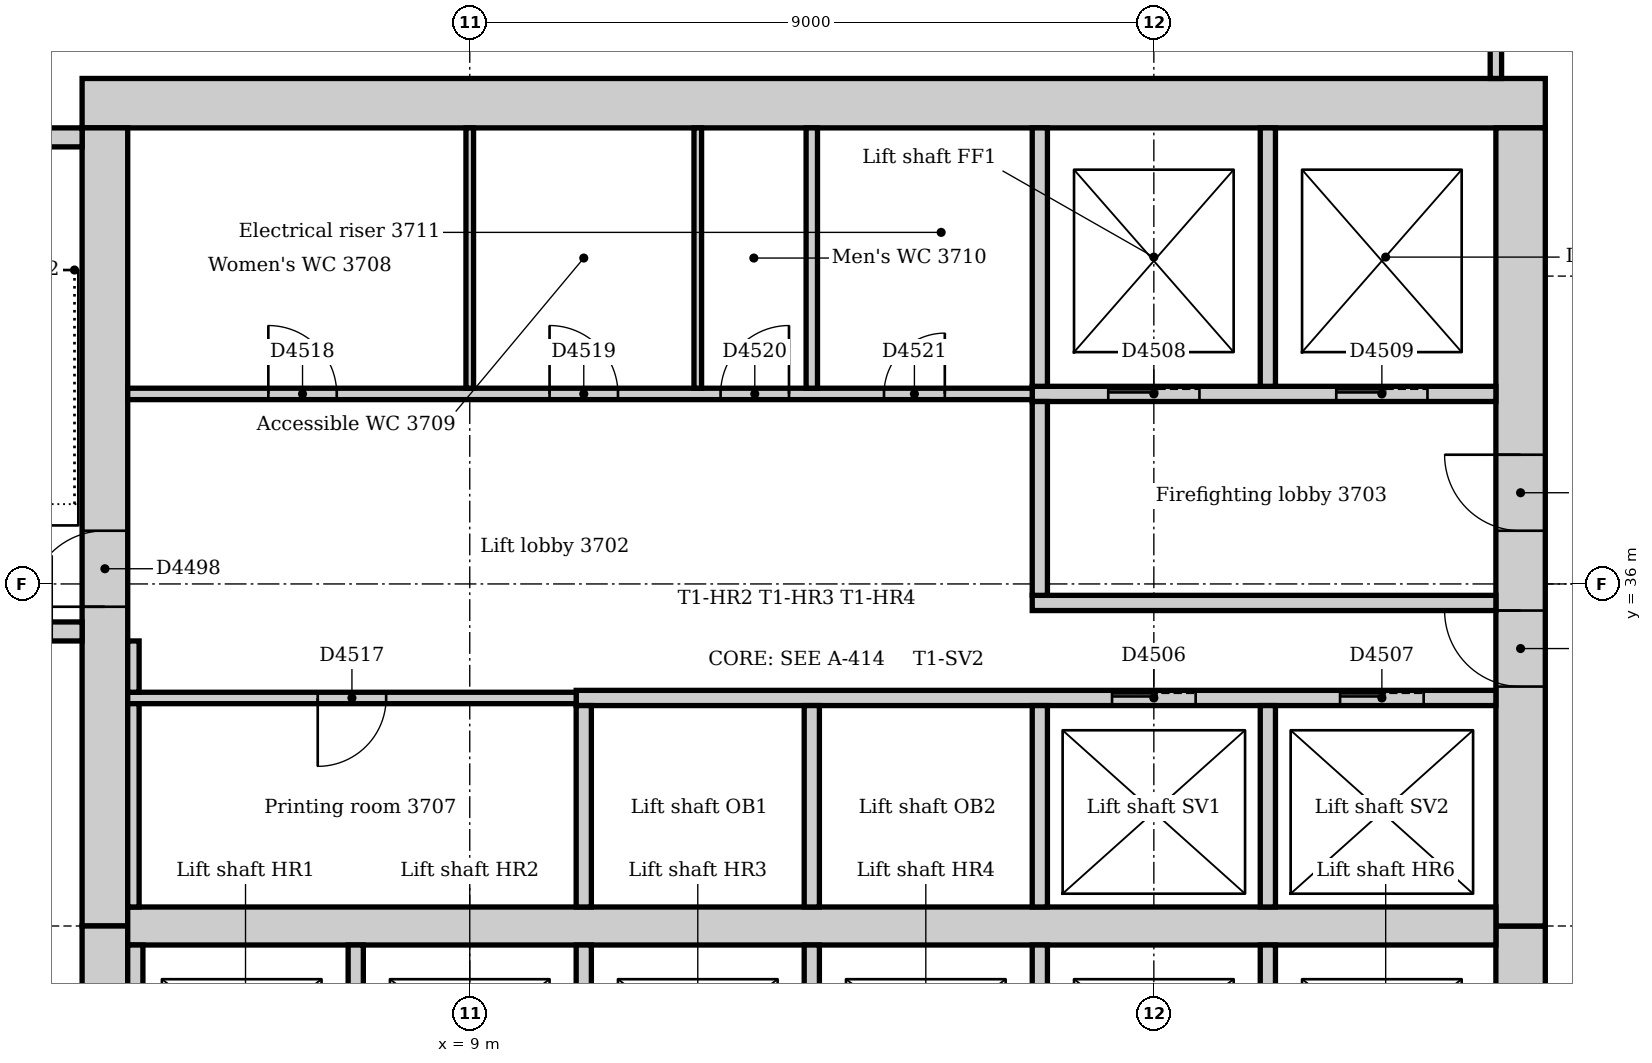
"""IFC4 building model, lengths in metres.
Left out: names, types, materials, properties, quantities, classifications, styles, units other than length and angle.
Written with IfcOpenShell. Run it as: python <this file> out.ifc"""

import sys

from ifc_helpers import new_model, si_unit, direction, frame, frame_2d, origin, place, context, subcontext, project, spatial, rectangle, extrude, element, fill, save


model = new_model("IFC4")
c1 = context("Model", 3, precision=1e-05, world=origin(), true_north=direction((0.0, 1.0)))
c2 = subcontext(c1, "Body", "Model", "MODEL_VIEW")
j1 = project(units=[si_unit("LENGTHUNIT", "METRE"), si_unit("PLANEANGLEUNIT", "RADIAN")], contexts=[c1])
p1 = place(None, origin())
s1 = spatial("IfcSite", under=j1, at=p1, CompositionType="ELEMENT")
p2 = place(p1, origin())
s2 = spatial("IfcBuilding", under=s1, at=p2, CompositionType="ELEMENT")
p3 = place(p2, frame((0.0, 0.0, 157.0)))
s3 = spatial("IfcBuildingStorey", under=s2, at=p3, CompositionType="ELEMENT", Elevation=157.0)
p4 = place(p3, frame((23.15, 42.325, 0.0), z_axis=(0.0, 0.0, 1.0), x_axis=(-1.0, 0.0, 0.0)))
e1 = element("IfcWall", 1, at=p4, inside=s3, PredefinedType="SOLIDWALL", context=c2, shape_type="SweptSolid", body=[
    extrude(rectangle(XDim=19.25, YDim=0.65, at=frame_2d((9.625, 0.0))), origin(), (0.0, 0.0, 1.0), 4.0),
])
p5 = place(p3, frame((22.825, 21.0, 0.0), z_axis=(0.0, 0.0, 1.0), x_axis=(0.0, 1.0, 0.0)))
e2 = element("IfcWall", 2, at=p5, inside=s3, PredefinedType="SOLIDWALL", context=c2, shape_type="SweptSolid", body=[
    extrude(rectangle(XDim=10.5, YDim=0.65, at=frame_2d((5.25, 0.0))), origin(), (0.0, 0.0, 1.0), 4.0),
])
p6 = place(p5, frame((4.35, 0.0, 0.0)))
e3 = element("IfcOpeningElement", 3, at=p6, cuts=e2, PredefinedType="OPENING", context=c2, shape_type="SweptSolid", body=[
    extrude(rectangle(XDim=1.8, YDim=2.1, at=frame_2d((0.9, 1.05))), frame((0.0, 0.335, 0.0), z_axis=(0.0, -1.0, 0.0), x_axis=(1.0, 0.0, 0.0)), (0.0, 0.0, 1.0), 0.67),
])
p7 = place(p3, frame((22.825, 31.5, 0.0), z_axis=(0.0, 0.0, 1.0), x_axis=(0.0, 1.0, 0.0)))
e4 = element("IfcWall", 4, at=p7, inside=s3, PredefinedType="SOLIDWALL", context=c2, shape_type="SweptSolid", body=[
    extrude(rectangle(XDim=10.5, YDim=0.65, at=frame_2d((5.25, 0.0))), origin(), (0.0, 0.0, 1.0), 4.0),
])
p8 = place(p7, frame((3.15, 0.0, 0.0)))
e5 = element("IfcOpeningElement", 5, at=p8, cuts=e4, PredefinedType="OPENING", context=c2, shape_type="SweptSolid", body=[
    extrude(rectangle(XDim=1.0, YDim=2.1, at=frame_2d((0.5, 1.05))), frame((0.0, 0.335, 0.0), z_axis=(0.0, -1.0, 0.0), x_axis=(1.0, 0.0, 0.0)), (0.0, 0.0, 1.0), 0.67),
])
p9 = place(p7, frame((5.2, 0.0, 0.0)))
e6 = element("IfcOpeningElement", 6, at=p9, cuts=e4, PredefinedType="OPENING", context=c2, shape_type="SweptSolid", body=[
    extrude(rectangle(XDim=1.0, YDim=2.1, at=frame_2d((0.5, 1.05))), frame((0.0, 0.335, 0.0), z_axis=(0.0, -1.0, 0.0), x_axis=(1.0, 0.0, 0.0)), (0.0, 0.0, 1.0), 0.67),
])
p10 = place(p3, frame((4.2, 42.0, 0.0), z_axis=(0.0, 0.0, 1.0), x_axis=(0.0, -1.0, 0.0)))
e7 = element("IfcWall", 7, at=p10, inside=s3, PredefinedType="SOLIDWALL", context=c2, shape_type="SweptSolid", body=[
    extrude(rectangle(XDim=10.5, YDim=0.6, at=frame_2d((5.25, 0.0))), origin(), (0.0, 0.0, 1.0), 4.0),
])
p11 = place(p10, frame((5.3, 0.0, 0.0)))
e8 = element("IfcOpeningElement", 8, at=p11, cuts=e7, PredefinedType="OPENING", context=c2, shape_type="SweptSolid", body=[
    extrude(rectangle(XDim=1.0, YDim=2.1, at=frame_2d((0.5, 1.05))), frame((0.0, 0.31, 0.0), z_axis=(0.0, -1.0, 0.0), x_axis=(1.0, 0.0, 0.0)), (0.0, 0.0, 1.0), 0.62),
])
p12 = place(p3, frame((4.2, 31.5, 0.0), z_axis=(0.0, 0.0, 1.0), x_axis=(0.0, -1.0, 0.0)))
e9 = element("IfcWall", 9, at=p12, inside=s3, PredefinedType="SOLIDWALL", context=c2, shape_type="SweptSolid", body=[
    extrude(rectangle(XDim=10.5, YDim=0.6, at=frame_2d((5.25, 0.0))), origin(), (0.0, 0.0, 1.0), 4.0),
])
p13 = place(p12, frame((4.25, 0.0, 0.0)))
e10 = element("IfcOpeningElement", 10, at=p13, cuts=e9, PredefinedType="OPENING", context=c2, shape_type="SweptSolid", body=[
    extrude(rectangle(XDim=1.0, YDim=2.1, at=frame_2d((0.5, 1.05))), frame((0.0, 0.31, 0.0), z_axis=(0.0, -1.0, 0.0), x_axis=(1.0, 0.0, 0.0)), (0.0, 0.0, 1.0), 0.62),
])
p14 = place(p3, frame((4.5, 31.5, 0.0), z_axis=(0.0, 0.0, 1.0), x_axis=(1.0, 0.0, 0.0)))
e11 = element("IfcWall", 11, at=p14, inside=s3, PredefinedType="SOLIDWALL", context=c2, shape_type="SweptSolid", body=[
    extrude(rectangle(XDim=18.0, YDim=0.5, at=frame_2d((9.0, 0.0))), origin(), (0.0, 0.0, 1.0), 4.0),
])
p15 = place(p3, frame((0.36, 35.375, 0.0), z_axis=(0.0, 0.0, 1.0), x_axis=(1.0, 0.0, 0.0)))
e12 = element("IfcWall", 12, at=p15, inside=s3, PredefinedType="SOLIDWALL", context=c2, shape_type="SweptSolid", body=[
    extrude(rectangle(XDim=3.54, YDim=0.25, at=frame_2d((1.77, 0.0))), origin(), (0.0, 0.0, 1.0), 4.0),
])
p16 = place(p15, frame((2.14, 0.0, 0.0)))
e13 = element("IfcOpeningElement", 13, at=p16, cuts=e12, PredefinedType="OPENING", context=c2, shape_type="SweptSolid", body=[
    extrude(rectangle(XDim=1.0, YDim=2.1, at=frame_2d((0.5, 1.05))), frame((0.0, 0.135, 0.0), z_axis=(0.0, -1.0, 0.0), x_axis=(1.0, 0.0, 0.0)), (0.0, 0.0, 1.0), 0.27),
])
p17 = place(p3, frame((3.9, 41.875, 0.0), z_axis=(0.0, 0.0, 1.0), x_axis=(-1.0, 0.0, 0.0)))
e14 = element("IfcWall", 14, at=p17, inside=s3, PredefinedType="SOLIDWALL", context=c2, shape_type="SweptSolid", body=[
    extrude(rectangle(XDim=3.54, YDim=0.25, at=frame_2d((1.77, 0.0))), origin(), (0.0, 0.0, 1.0), 4.0),
])
p18 = place(p3, frame((16.4, 35.75, 0.0), z_axis=(0.0, 0.0, 1.0), x_axis=(1.0, 0.0, 0.0)))
e15 = element("IfcWall", 15, at=p18, inside=s3, PredefinedType="PARTITIONING", context=c2, shape_type="SweptSolid", body=[
    extrude(rectangle(XDim=6.1, YDim=0.2, at=frame_2d((3.05, 0.0))), origin(), (0.0, 0.0, 1.0), 3.85),
])
p19 = place(p3, frame((16.4, 38.5, 0.0), z_axis=(0.0, 0.0, 1.0), x_axis=(1.0, 0.0, 0.0)))
e16 = element("IfcWall", 16, at=p19, inside=s3, PredefinedType="PARTITIONING", context=c2, shape_type="SweptSolid", body=[
    extrude(rectangle(XDim=6.1, YDim=0.2, at=frame_2d((3.05, 0.0))), origin(), (0.0, 0.0, 1.0), 3.85),
])
p20 = place(p19, frame((1.0, 0.0, 0.0)))
e17 = element("IfcOpeningElement", 17, at=p20, cuts=e16, PredefinedType="OPENING", context=c2, shape_type="SweptSolid", body=[
    extrude(rectangle(XDim=1.2, YDim=2.1, at=frame_2d((0.6, 1.05))), frame((0.0, 0.11, 0.0), z_axis=(0.0, -1.0, 0.0), x_axis=(1.0, 0.0, 0.0)), (0.0, 0.0, 1.0), 0.22),
])
p21 = place(p19, frame((4.0, 0.0, 0.0)))
e18 = element("IfcOpeningElement", 18, at=p21, cuts=e16, PredefinedType="OPENING", context=c2, shape_type="SweptSolid", body=[
    extrude(rectangle(XDim=1.2, YDim=2.1, at=frame_2d((0.6, 1.05))), frame((0.0, 0.11, 0.0), z_axis=(0.0, -1.0, 0.0), x_axis=(1.0, 0.0, 0.0)), (0.0, 0.0, 1.0), 0.22),
])
p22 = place(p3, frame((16.5, 35.85, 0.0), z_axis=(0.0, 0.0, 1.0), x_axis=(0.0, 1.0, 0.0)))
e19 = element("IfcWall", 19, at=p22, inside=s3, PredefinedType="PARTITIONING", context=c2, shape_type="SweptSolid", body=[
    extrude(rectangle(XDim=2.55, YDim=0.2, at=frame_2d((1.275, 0.0))), origin(), (0.0, 0.0, 1.0), 3.85),
])
p23 = place(p3, frame((10.4, 34.5, 0.0), z_axis=(0.0, 0.0, 1.0), x_axis=(1.0, 0.0, 0.0)))
e20 = element("IfcWall", 20, at=p23, inside=s3, PredefinedType="PARTITIONING", context=c2, shape_type="SweptSolid", body=[
    extrude(rectangle(XDim=12.1, YDim=0.2, at=frame_2d((6.05, 0.0))), origin(), (0.0, 0.0, 1.0), 3.85),
])
p24 = place(p23, frame((7.05, 0.0, 0.0)))
e21 = element("IfcOpeningElement", 21, at=p24, cuts=e20, PredefinedType="OPENING", context=c2, shape_type="SweptSolid", body=[
    extrude(rectangle(XDim=1.1, YDim=2.1, at=frame_2d((0.55, 1.05))), frame((0.0, 0.11, 0.0), z_axis=(0.0, -1.0, 0.0), x_axis=(1.0, 0.0, 0.0)), (0.0, 0.0, 1.0), 0.22),
])
p25 = place(p23, frame((10.05, 0.0, 0.0)))
e22 = element("IfcOpeningElement", 22, at=p25, cuts=e20, PredefinedType="OPENING", context=c2, shape_type="SweptSolid", body=[
    extrude(rectangle(XDim=1.1, YDim=2.1, at=frame_2d((0.55, 1.05))), frame((0.0, 0.11, 0.0), z_axis=(0.0, -1.0, 0.0), x_axis=(1.0, 0.0, 0.0)), (0.0, 0.0, 1.0), 0.22),
])
for number, where, z_axis, x_axis in (
    (23, (10.5, 28.6, 0.0), (0.0, 0.0, 1.0), (0.0, 1.0, 0.0)),
    (24, (10.5, 31.75, 0.0), (0.0, 0.0, 1.0), (0.0, 1.0, 0.0)),
    (25, (13.5, 28.6, 0.0), (0.0, 0.0, 1.0), (0.0, 1.0, 0.0)),
    (26, (13.5, 31.75, 0.0), (0.0, 0.0, 1.0), (0.0, 1.0, 0.0)),
    (27, (16.5, 28.6, 0.0), (0.0, 0.0, 1.0), (0.0, 1.0, 0.0)),
    (28, (16.5, 31.75, 0.0), (0.0, 0.0, 1.0), (0.0, 1.0, 0.0)),
    (29, (19.5, 28.6, 0.0), (0.0, 0.0, 1.0), (0.0, 1.0, 0.0)),
    (30, (19.5, 31.75, 0.0), (0.0, 0.0, 1.0), (0.0, 1.0, 0.0)),
):
    element("IfcWall", number, at=place(p3, frame(where, z_axis=z_axis, x_axis=x_axis)), inside=s3, PredefinedType="PARTITIONING", context=c2, shape_type="SweptSolid", body=[
        extrude(rectangle(XDim=2.65, YDim=0.2, at=frame_2d((1.325, 0.0))), origin(), (0.0, 0.0, 1.0), 3.85),
    ])
for number, where, z_axis, x_axis in (
    (31, (16.5, 38.6, 0.0), (0.0, 0.0, 1.0), (0.0, 1.0, 0.0)),
    (32, (19.5, 38.6, 0.0), (0.0, 0.0, 1.0), (0.0, 1.0, 0.0)),
):
    element("IfcWall", number, at=place(p3, frame(where, z_axis=z_axis, x_axis=x_axis)), inside=s3, PredefinedType="PARTITIONING", context=c2, shape_type="SweptSolid", body=[
        extrude(rectangle(XDim=3.4, YDim=0.2, at=frame_2d((1.7, 0.0))), origin(), (0.0, 0.0, 1.0), 3.85),
    ])
for number, where, z_axis, x_axis in (
    (33, (4.6, 28.6, 0.0), (0.0, 0.0, 1.0), (0.0, 1.0, 0.0)),
    (34, (7.5, 28.6, 0.0), (0.0, 0.0, 1.0), (0.0, 1.0, 0.0)),
):
    element("IfcWall", number, at=place(p3, frame(where, z_axis=z_axis, x_axis=x_axis)), inside=s3, PredefinedType="PARTITIONING", context=c2, shape_type="SweptSolid", body=[
        extrude(rectangle(XDim=2.65, YDim=0.2, at=frame_2d((1.325, 0.0))), origin(), (0.0, 0.0, 1.0), 3.85),
    ])
p26 = place(p3, frame((4.5, 38.5, 0.0), z_axis=(0.0, 0.0, 1.0), x_axis=(1.0, 0.0, 0.0)))
e35 = element("IfcWall", 35, at=p26, inside=s3, PredefinedType="PARTITIONING", context=c2, shape_type="SweptSolid", body=[
    extrude(rectangle(XDim=11.9, YDim=0.15, at=frame_2d((5.95, 0.0))), origin(), (0.0, 0.0, 1.0), 3.85),
])
p27 = place(p26, frame((1.85, 0.0, 0.0)))
e36 = element("IfcOpeningElement", 36, at=p27, cuts=e35, PredefinedType="OPENING", context=c2, shape_type="SweptSolid", body=[
    extrude(rectangle(XDim=0.9, YDim=2.1, at=frame_2d((0.45, 1.05))), frame((0.0, 0.085, 0.0), z_axis=(0.0, -1.0, 0.0), x_axis=(1.0, 0.0, 0.0)), (0.0, 0.0, 1.0), 0.17),
])
p28 = place(p26, frame((5.55, 0.0, 0.0)))
e37 = element("IfcOpeningElement", 37, at=p28, cuts=e35, PredefinedType="OPENING", context=c2, shape_type="SweptSolid", body=[
    extrude(rectangle(XDim=0.9, YDim=2.1, at=frame_2d((0.45, 1.05))), frame((0.0, 0.085, 0.0), z_axis=(0.0, -1.0, 0.0), x_axis=(1.0, 0.0, 0.0)), (0.0, 0.0, 1.0), 0.17),
])
p29 = place(p26, frame((7.8, 0.0, 0.0)))
e38 = element("IfcOpeningElement", 38, at=p29, cuts=e35, PredefinedType="OPENING", context=c2, shape_type="SweptSolid", body=[
    extrude(rectangle(XDim=0.9, YDim=2.1, at=frame_2d((0.45, 1.05))), frame((0.0, 0.085, 0.0), z_axis=(0.0, -1.0, 0.0), x_axis=(1.0, 0.0, 0.0)), (0.0, 0.0, 1.0), 0.17),
])
p30 = place(p26, frame((9.95, 0.0, 0.0)))
e39 = element("IfcOpeningElement", 39, at=p30, cuts=e35, PredefinedType="OPENING", context=c2, shape_type="SweptSolid", body=[
    extrude(rectangle(XDim=0.8, YDim=2.1, at=frame_2d((0.4, 1.05))), frame((0.0, 0.085, 0.0), z_axis=(0.0, -1.0, 0.0), x_axis=(1.0, 0.0, 0.0)), (0.0, 0.0, 1.0), 0.17),
])
p31 = place(p3, frame((4.5, 34.5, 0.0), z_axis=(0.0, 0.0, 1.0), x_axis=(1.0, 0.0, 0.0)))
e40 = element("IfcWall", 40, at=p31, inside=s3, PredefinedType="PARTITIONING", context=c2, shape_type="SweptSolid", body=[
    extrude(rectangle(XDim=5.9, YDim=0.15, at=frame_2d((2.95, 0.0))), origin(), (0.0, 0.0, 1.0), 3.85),
])
p32 = place(p31, frame((2.5, 0.0, 0.0)))
e41 = element("IfcOpeningElement", 41, at=p32, cuts=e40, PredefinedType="OPENING", context=c2, shape_type="SweptSolid", body=[
    extrude(rectangle(XDim=0.9, YDim=2.1, at=frame_2d((0.45, 1.05))), frame((0.0, 0.085, 0.0), z_axis=(0.0, -1.0, 0.0), x_axis=(1.0, 0.0, 0.0)), (0.0, 0.0, 1.0), 0.17),
])
p33 = place(p3, frame((4.575, 34.575, 0.0), z_axis=(0.0, 0.0, 1.0), x_axis=(0.0, 1.0, 0.0)))
e42 = element("IfcWall", 42, at=p33, inside=s3, PredefinedType="PARTITIONING", context=c2, shape_type="SweptSolid", body=[
    extrude(rectangle(XDim=0.675, YDim=0.15, at=frame_2d((0.338, 0.0))), origin(), (0.0, 0.0, 1.0), 3.85),
])
p34 = place(p3, frame((4.575, 31.75, 0.0), z_axis=(0.0, 0.0, 1.0), x_axis=(0.0, 1.0, 0.0)))
e43 = element("IfcWall", 43, at=p34, inside=s3, PredefinedType="PARTITIONING", context=c2, shape_type="SweptSolid", body=[
    extrude(rectangle(XDim=2.675, YDim=0.15, at=frame_2d((1.337, 0.0))), origin(), (0.0, 0.0, 1.0), 3.85),
])
p35 = place(p3, frame((22.5, 42.65, 0.0), z_axis=(0.0, 0.0, 1.0), x_axis=(0.0, 1.0, 0.0)))
e44 = element("IfcWall", 44, at=p35, inside=s3, PredefinedType="PARTITIONING", context=c2, shape_type="SweptSolid", body=[
    extrude(rectangle(XDim=1.825, YDim=0.15, at=frame_2d((0.912, 0.0))), origin(), (0.0, 0.0, 1.0), 3.85),
])
p36 = place(p3, frame((13.5, 38.575, 0.0), z_axis=(0.0, 0.0, 1.0), x_axis=(0.0, 1.0, 0.0)))
e45 = element("IfcWall", 45, at=p36, inside=s3, PredefinedType="PARTITIONING", context=c2, shape_type="SweptSolid", body=[
    extrude(rectangle(XDim=3.425, YDim=0.15, at=frame_2d((1.712, 0.0))), origin(), (0.0, 0.0, 1.0), 3.85),
])
for number, where, z_axis, x_axis in (
    (46, (9.0, 38.575, 0.0), (0.0, 0.0, 1.0), (0.0, 1.0, 0.0)),
    (47, (12.0, 38.575, 0.0), (0.0, 0.0, 1.0), (0.0, 1.0, 0.0)),
):
    element("IfcWall", number, at=place(p3, frame(where, z_axis=z_axis, x_axis=x_axis)), inside=s3, PredefinedType="PARTITIONING", context=c2, shape_type="SweptSolid", body=[
        extrude(rectangle(XDim=3.425, YDim=0.1, at=frame_2d((1.712, 0.0))), origin(), (0.0, 0.0, 1.0), 3.85),
    ])
p37 = place(p11, frame((1.0, 0.0, 0.0), z_axis=(0.0, 0.0, 1.0), x_axis=(-1.0, 0.0, 0.0)))
e48 = element("IfcDoor", 48, at=p37, inside=s3, OperationType="SINGLE_SWING_LEFT", PredefinedType="DOOR", context=c2, shape_type="SweptSolid", body=[
    extrude(rectangle(XDim=1.0, YDim=2.1, at=frame_2d((0.5, 1.05))), frame((0.0, 0.025, 0.0), z_axis=(0.0, -1.0, 0.0), x_axis=(1.0, 0.0, 0.0)), (0.0, 0.0, 1.0), 0.05),
])
fill(e8, e48)
p38 = place(p24, origin())
e49 = element("IfcDoor", 49, at=p38, inside=s3, OperationType="SLIDING_TO_LEFT", PredefinedType="DOOR", context=c2, shape_type="SweptSolid", body=[
    extrude(rectangle(XDim=1.1, YDim=2.1, at=frame_2d((0.55, 1.05))), frame((0.0, 0.025, 0.0), z_axis=(0.0, -1.0, 0.0), x_axis=(1.0, 0.0, 0.0)), (0.0, 0.0, 1.0), 0.05),
])
fill(e21, e49)
p39 = place(p25, origin())
e50 = element("IfcDoor", 50, at=p39, inside=s3, OperationType="SLIDING_TO_LEFT", PredefinedType="DOOR", context=c2, shape_type="SweptSolid", body=[
    extrude(rectangle(XDim=1.1, YDim=2.1, at=frame_2d((0.55, 1.05))), frame((0.0, 0.025, 0.0), z_axis=(0.0, -1.0, 0.0), x_axis=(1.0, 0.0, 0.0)), (0.0, 0.0, 1.0), 0.05),
])
fill(e22, e50)
p40 = place(p20, origin())
e51 = element("IfcDoor", 51, at=p40, inside=s3, OperationType="SLIDING_TO_LEFT", PredefinedType="DOOR", context=c2, shape_type="SweptSolid", body=[
    extrude(rectangle(XDim=1.2, YDim=2.1, at=frame_2d((0.6, 1.05))), frame((0.0, 0.025, 0.0), z_axis=(0.0, -1.0, 0.0), x_axis=(1.0, 0.0, 0.0)), (0.0, 0.0, 1.0), 0.05),
])
fill(e17, e51)
p41 = place(p21, origin())
e52 = element("IfcDoor", 52, at=p41, inside=s3, OperationType="SLIDING_TO_LEFT", PredefinedType="DOOR", context=c2, shape_type="SweptSolid", body=[
    extrude(rectangle(XDim=1.2, YDim=2.1, at=frame_2d((0.6, 1.05))), frame((0.0, 0.025, 0.0), z_axis=(0.0, -1.0, 0.0), x_axis=(1.0, 0.0, 0.0)), (0.0, 0.0, 1.0), 0.05),
])
fill(e18, e52)
p42 = place(p8, origin())
e53 = element("IfcDoor", 53, at=p42, inside=s3, OperationType="SINGLE_SWING_RIGHT", PredefinedType="DOOR", context=c2, shape_type="SweptSolid", body=[
    extrude(rectangle(XDim=1.0, YDim=2.1, at=frame_2d((0.5, 1.05))), frame((0.0, 0.025, 0.0), z_axis=(0.0, -1.0, 0.0), x_axis=(1.0, 0.0, 0.0)), (0.0, 0.0, 1.0), 0.05),
])
fill(e5, e53)
p43 = place(p9, origin())
e54 = element("IfcDoor", 54, at=p43, inside=s3, OperationType="SINGLE_SWING_RIGHT", PredefinedType="DOOR", context=c2, shape_type="SweptSolid", body=[
    extrude(rectangle(XDim=1.0, YDim=2.1, at=frame_2d((0.5, 1.05))), frame((0.0, 0.025, 0.0), z_axis=(0.0, -1.0, 0.0), x_axis=(1.0, 0.0, 0.0)), (0.0, 0.0, 1.0), 0.05),
])
fill(e6, e54)
p44 = place(p32, frame((0.9, 0.0, 0.0), z_axis=(0.0, 0.0, 1.0), x_axis=(-1.0, 0.0, 0.0)))
e55 = element("IfcDoor", 55, at=p44, inside=s3, OperationType="SINGLE_SWING_RIGHT", PredefinedType="DOOR", context=c2, shape_type="SweptSolid", body=[
    extrude(rectangle(XDim=0.9, YDim=2.1, at=frame_2d((0.45, 1.05))), frame((0.0, 0.025, 0.0), z_axis=(0.0, -1.0, 0.0), x_axis=(1.0, 0.0, 0.0)), (0.0, 0.0, 1.0), 0.05),
])
fill(e41, e55)
p45 = place(p27, origin())
e56 = element("IfcDoor", 56, at=p45, inside=s3, OperationType="SINGLE_SWING_LEFT", PredefinedType="DOOR", context=c2, shape_type="SweptSolid", body=[
    extrude(rectangle(XDim=0.9, YDim=2.1, at=frame_2d((0.45, 1.05))), frame((0.0, 0.025, 0.0), z_axis=(0.0, -1.0, 0.0), x_axis=(1.0, 0.0, 0.0)), (0.0, 0.0, 1.0), 0.05),
])
fill(e36, e56)
p46 = place(p28, origin())
e57 = element("IfcDoor", 57, at=p46, inside=s3, OperationType="SINGLE_SWING_LEFT", PredefinedType="DOOR", context=c2, shape_type="SweptSolid", body=[
    extrude(rectangle(XDim=0.9, YDim=2.1, at=frame_2d((0.45, 1.05))), frame((0.0, 0.025, 0.0), z_axis=(0.0, -1.0, 0.0), x_axis=(1.0, 0.0, 0.0)), (0.0, 0.0, 1.0), 0.05),
])
fill(e37, e57)
p47 = place(p29, origin())
e58 = element("IfcDoor", 58, at=p47, inside=s3, OperationType="SINGLE_SWING_RIGHT", PredefinedType="DOOR", context=c2, shape_type="SweptSolid", body=[
    extrude(rectangle(XDim=0.9, YDim=2.1, at=frame_2d((0.45, 1.05))), frame((0.0, 0.025, 0.0), z_axis=(0.0, -1.0, 0.0), x_axis=(1.0, 0.0, 0.0)), (0.0, 0.0, 1.0), 0.05),
])
fill(e38, e58)
p48 = place(p30, origin())
e59 = element("IfcDoor", 59, at=p48, inside=s3, OperationType="SINGLE_SWING_RIGHT", PredefinedType="DOOR", context=c2, shape_type="SweptSolid", body=[
    extrude(rectangle(XDim=0.8, YDim=2.1, at=frame_2d((0.4, 1.05))), frame((0.0, 0.025, 0.0), z_axis=(0.0, -1.0, 0.0), x_axis=(1.0, 0.0, 0.0)), (0.0, 0.0, 1.0), 0.05),
])
fill(e39, e59)
save(model, sys.argv[1])
